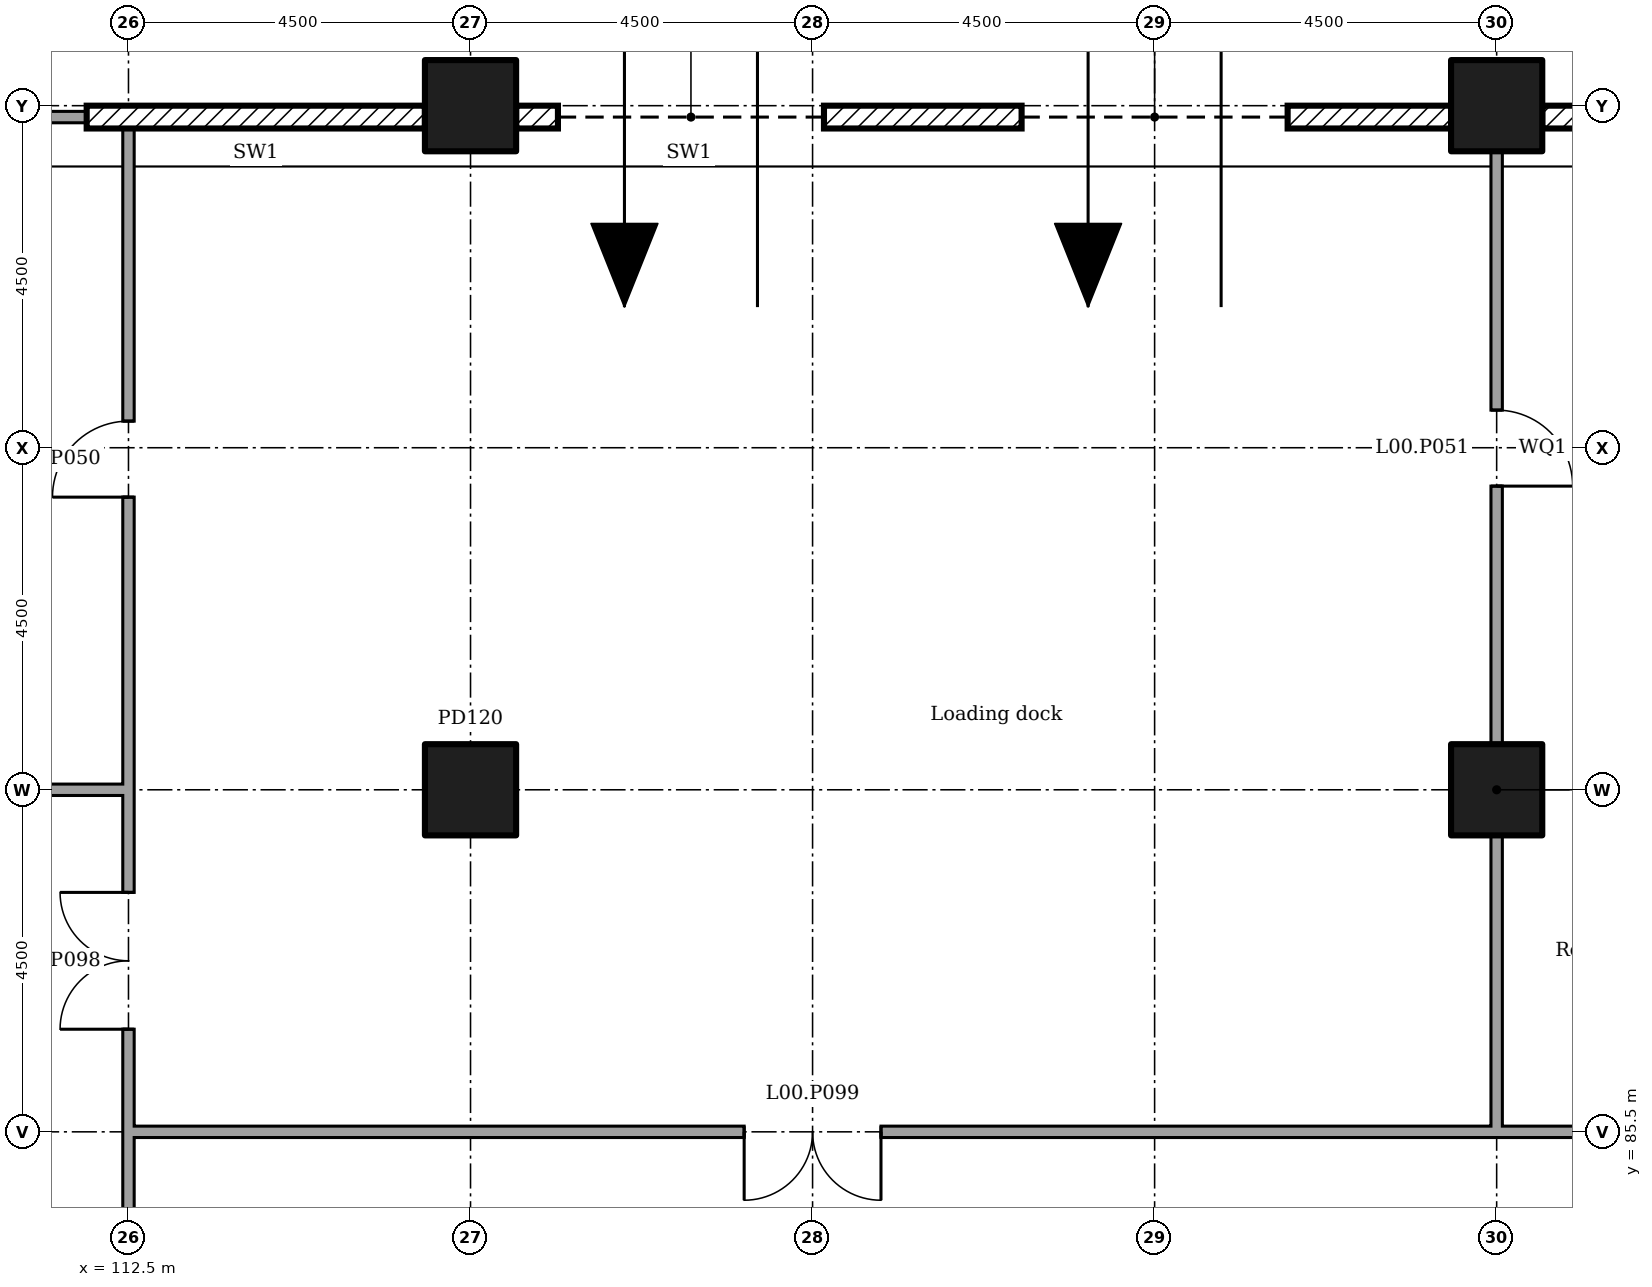
"""IFC4 building model, lengths in metres.
Left out: names, types, materials, properties, quantities, classifications, styles, units other than length and angle.
Written with IfcOpenShell. Run it as: python <this file> out.ifc"""

import sys

from ifc_helpers import new_model, si_unit, direction, frame, frame_2d, origin, origin_2d, place, context, subcontext, project, spatial, rectangle, extrude, element, fill, save


model = new_model("IFC4")
c1 = context("Model", 3, precision=1e-05, world=origin(), true_north=direction((0.0, 1.0)))
c2 = subcontext(c1, "Body", "Model", "MODEL_VIEW")
j1 = project(units=[si_unit("LENGTHUNIT", "METRE"), si_unit("PLANEANGLEUNIT", "RADIAN")], contexts=[c1])
p1 = place(None, origin())
s1 = spatial("IfcSite", under=j1, at=p1, CompositionType="ELEMENT")
p2 = place(p1, origin())
s2 = spatial("IfcBuilding", under=s1, at=p2, CompositionType="ELEMENT")
p3 = place(p2, origin())
s3 = spatial("IfcBuildingStorey", under=s2, at=p3, CompositionType="ELEMENT", Elevation=0.0)
for number, where in (
    (1, (117.0, 90.0, 0.0)),
    (2, (117.0, 99.0, 0.0)),
    (3, (130.5, 90.0, 0.0)),
    (4, (130.5, 99.0, 0.0)),
):
    element("IfcColumn", number, at=place(p3, frame(where)), inside=s3, PredefinedType="COLUMN", context=c2, shape_type="SweptSolid", body=[
        extrude(rectangle(XDim=1.2, YDim=1.2, at=origin_2d()), origin(), (0.0, 0.0, 1.0), 6.0),
    ])
p4 = place(p3, frame((135.217, 98.85, 0.0), z_axis=(0.0, 0.0, 1.0), x_axis=(-1.0, 0.0, 0.0)))
e5 = element("IfcWall", 5, at=p4, inside=s3, PredefinedType="ELEMENTEDWALL", context=c2, shape_type="SweptSolid", body=[
    extrude(rectangle(XDim=4.116, YDim=0.3, at=frame_2d((2.058, 0.0))), origin(), (0.0, 0.0, 1.0), 5.55),
])
p5 = place(p3, frame((129.9, 98.85, 0.0), z_axis=(0.0, 0.0, 1.0), x_axis=(-1.0, 0.0, 0.0)))
e6 = element("IfcWall", 6, at=p5, inside=s3, PredefinedType="ELEMENTEDWALL", context=c2, shape_type="SweptSolid", body=[
    extrude(rectangle(XDim=1.65, YDim=0.3, at=frame_2d((0.825, 0.0))), origin(), (0.0, 0.0, 1.0), 5.55),
])
p6 = place(p3, frame((128.25, 98.85, 0.0), z_axis=(0.0, 0.0, 1.0), x_axis=(-1.0, 0.0, 0.0)))
e7 = element("IfcWall", 7, at=p6, inside=s3, PredefinedType="ELEMENTEDWALL", context=c2, shape_type="SweptSolid", body=[
    extrude(rectangle(XDim=4.5, YDim=0.3, at=frame_2d((2.25, 0.0))), origin(), (0.0, 0.0, 1.0), 5.55),
])
p7 = place(p6, frame((0.5, 0.0, 0.0)))
e8 = element("IfcOpeningElement", 8, at=p7, cuts=e7, PredefinedType="OPENING", context=c2, shape_type="SweptSolid", body=[
    extrude(rectangle(XDim=3.5, YDim=4.5, at=frame_2d((1.75, 2.25))), frame((0.0, 0.16, 0.0), z_axis=(0.0, -1.0, 0.0), x_axis=(1.0, 0.0, 0.0)), (0.0, 0.0, 1.0), 0.32),
])
p8 = place(p3, frame((123.75, 98.85, 0.0), z_axis=(0.0, 0.0, 1.0), x_axis=(-1.0, 0.0, 0.0)))
e9 = element("IfcWall", 9, at=p8, inside=s3, PredefinedType="ELEMENTEDWALL", context=c2, shape_type="SweptSolid", body=[
    extrude(rectangle(XDim=1.6, YDim=0.3, at=frame_2d((0.8, 0.0))), origin(), (0.0, 0.0, 1.0), 5.55),
])
p9 = place(p3, frame((122.15, 98.85, 0.0), z_axis=(0.0, 0.0, 1.0), x_axis=(-1.0, 0.0, 0.0)))
e10 = element("IfcWall", 10, at=p9, inside=s3, PredefinedType="ELEMENTEDWALL", context=c2, shape_type="SweptSolid", body=[
    extrude(rectangle(XDim=4.55, YDim=0.3, at=frame_2d((2.275, 0.0))), origin(), (0.0, 0.0, 1.0), 5.55),
])
p10 = place(p9, frame((0.5, 0.0, 0.0)))
e11 = element("IfcOpeningElement", 11, at=p10, cuts=e10, PredefinedType="OPENING", context=c2, shape_type="SweptSolid", body=[
    extrude(rectangle(XDim=3.5, YDim=4.5, at=frame_2d((1.75, 2.25))), frame((0.0, 0.16, 0.0), z_axis=(0.0, -1.0, 0.0), x_axis=(1.0, 0.0, 0.0)), (0.0, 0.0, 1.0), 0.32),
])
p11 = place(p3, frame((116.4, 98.85, 0.0), z_axis=(0.0, 0.0, 1.0), x_axis=(-1.0, 0.0, 0.0)))
e12 = element("IfcWall", 12, at=p11, inside=s3, PredefinedType="ELEMENTEDWALL", context=c2, shape_type="SweptSolid", body=[
    extrude(rectangle(XDim=4.45, YDim=0.3, at=frame_2d((2.225, 0.0))), origin(), (0.0, 0.0, 1.0), 5.55),
])
p12 = place(p3, frame((111.95, 98.85, 0.0), z_axis=(0.0, 0.0, 1.0), x_axis=(-1.0, 0.0, 0.0)))
e13 = element("IfcWall", 13, at=p12, inside=s3, PredefinedType="SOLIDWALL", context=c2, shape_type="SweptSolid", body=[
    extrude(rectangle(XDim=3.4, YDim=0.15, at=frame_2d((1.7, 0.0))), origin(), (0.0, 0.0, 1.0), 5.55),
])
p13 = place(p12, frame((0.5, 0.0, 0.0)))
e14 = element("IfcOpeningElement", 14, at=p13, cuts=e13, PredefinedType="OPENING", context=c2, shape_type="SweptSolid", body=[
    extrude(rectangle(XDim=2.4, YDim=2.7, at=frame_2d((1.2, 1.35))), frame((0.0, 0.085, 0.0), z_axis=(0.0, -1.0, 0.0), x_axis=(1.0, 0.0, 0.0)), (0.0, 0.0, 1.0), 0.17),
])
p14 = place(p3, frame((112.5, 81.075, 0.0), z_axis=(0.0, 0.0, 1.0), x_axis=(0.0, 1.0, 0.0)))
e15 = element("IfcWall", 15, at=p14, inside=s3, PredefinedType="PARTITIONING", context=c2, shape_type="SweptSolid", body=[
    extrude(rectangle(XDim=4.5, YDim=0.15, at=frame_2d((2.25, 0.0))), origin(), (0.0, 0.0, 1.0), 5.55),
])
p15 = place(p14, frame((1.275, 0.0, 0.0)))
e16 = element("IfcOpeningElement", 16, at=p15, cuts=e15, PredefinedType="OPENING", context=c2, shape_type="SweptSolid", body=[
    extrude(rectangle(XDim=1.8, YDim=2.1, at=frame_2d((0.9, 1.05))), frame((0.0, 0.085, 0.0), z_axis=(0.0, -1.0, 0.0), x_axis=(1.0, 0.0, 0.0)), (0.0, 0.0, 1.0), 0.17),
])
p16 = place(p3, frame((104.095, 90.0, 0.0)))
e17 = element("IfcWall", 17, at=p16, inside=s3, PredefinedType="PARTITIONING", context=c2, shape_type="SweptSolid", body=[
    extrude(rectangle(XDim=8.48, YDim=0.15, at=frame_2d((4.24, 0.0))), origin(), (0.0, 0.0, 1.0), 5.55),
])
p17 = place(p3, frame((112.5, 85.5, 0.0), z_axis=(0.0, 0.0, 1.0), x_axis=(0.0, 1.0, 0.0)))
e18 = element("IfcWall", 18, at=p17, inside=s3, PredefinedType="PARTITIONING", context=c2, shape_type="SweptSolid", body=[
    extrude(rectangle(XDim=4.425, YDim=0.15, at=frame_2d((2.212, 0.0))), origin(), (0.0, 0.0, 1.0), 5.55),
])
p18 = place(p17, frame((1.35, 0.0, 0.0)))
e19 = element("IfcOpeningElement", 19, at=p18, cuts=e18, PredefinedType="OPENING", context=c2, shape_type="SweptSolid", body=[
    extrude(rectangle(XDim=1.8, YDim=2.1, at=frame_2d((0.9, 1.05))), frame((0.0, 0.085, 0.0), z_axis=(0.0, -1.0, 0.0), x_axis=(1.0, 0.0, 0.0)), (0.0, 0.0, 1.0), 0.17),
])
p19 = place(p3, frame((112.575, 85.5, 0.0)))
e20 = element("IfcWall", 20, at=p19, inside=s3, PredefinedType="PARTITIONING", context=c2, shape_type="SweptSolid", body=[
    extrude(rectangle(XDim=18.0, YDim=0.15, at=frame_2d((9.0, 0.0))), origin(), (0.0, 0.0, 1.0), 5.55),
])
p20 = place(p19, frame((8.025, 0.0, 0.0)))
e21 = element("IfcOpeningElement", 21, at=p20, cuts=e20, PredefinedType="OPENING", context=c2, shape_type="SweptSolid", body=[
    extrude(rectangle(XDim=1.8, YDim=2.1, at=frame_2d((0.9, 1.05))), frame((0.0, 0.085, 0.0), z_axis=(0.0, -1.0, 0.0), x_axis=(1.0, 0.0, 0.0)), (0.0, 0.0, 1.0), 0.17),
])
p21 = place(p3, frame((130.5, 85.5, 0.0)))
e22 = element("IfcWall", 22, at=p21, inside=s3, PredefinedType="PARTITIONING", context=c2, shape_type="SweptSolid", body=[
    extrude(rectangle(XDim=4.425, YDim=0.15, at=frame_2d((2.212, 0.0))), origin(), (0.0, 0.0, 1.0), 5.55),
])
p22 = place(p3, frame((112.5, 90.0, 0.0), z_axis=(0.0, 0.0, 1.0), x_axis=(0.0, 1.0, 0.0)))
e23 = element("IfcWall", 23, at=p22, inside=s3, PredefinedType="PARTITIONING", context=c2, shape_type="SweptSolid", body=[
    extrude(rectangle(XDim=8.7, YDim=0.15, at=frame_2d((4.35, 0.0))), origin(), (0.0, 0.0, 1.0), 5.55),
])
p23 = place(p22, frame((3.85, 0.0, 0.0)))
e24 = element("IfcOpeningElement", 24, at=p23, cuts=e23, PredefinedType="OPENING", context=c2, shape_type="SweptSolid", body=[
    extrude(rectangle(XDim=1.0, YDim=2.1, at=frame_2d((0.5, 1.05))), frame((0.0, 0.085, 0.0), z_axis=(0.0, -1.0, 0.0), x_axis=(1.0, 0.0, 0.0)), (0.0, 0.0, 1.0), 0.17),
])
p24 = place(p3, frame((130.5, 85.575, 0.0), z_axis=(0.0, 0.0, 1.0), x_axis=(0.0, 1.0, 0.0)))
e25 = element("IfcWall", 25, at=p24, inside=s3, PredefinedType="PARTITIONING", context=c2, shape_type="SweptSolid", body=[
    extrude(rectangle(XDim=3.83, YDim=0.15, at=frame_2d((1.915, 0.0))), origin(), (0.0, 0.0, 1.0), 5.55),
])
p25 = place(p3, frame((130.5, 90.595, 0.0), z_axis=(0.0, 0.0, 1.0), x_axis=(0.0, 1.0, 0.0)))
e26 = element("IfcWall", 26, at=p25, inside=s3, PredefinedType="PARTITIONING", context=c2, shape_type="SweptSolid", body=[
    extrude(rectangle(XDim=7.81, YDim=0.15, at=frame_2d((3.905, 0.0))), origin(), (0.0, 0.0, 1.0), 5.55),
])
p26 = place(p25, frame((3.4, 0.0, 0.0)))
e27 = element("IfcOpeningElement", 27, at=p26, cuts=e26, PredefinedType="OPENING", context=c2, shape_type="SweptSolid", body=[
    extrude(rectangle(XDim=1.0, YDim=2.1, at=frame_2d((0.5, 1.05))), frame((0.0, 0.085, 0.0), z_axis=(0.0, -1.0, 0.0), x_axis=(1.0, 0.0, 0.0)), (0.0, 0.0, 1.0), 0.17),
])
p27 = place(p7, origin())
e28 = element("IfcDoor", 28, at=p27, inside=s3, OperationType="ROLLINGUP", PredefinedType="NOTDEFINED", context=c2, shape_type="SweptSolid", body=[
    extrude(rectangle(XDim=3.5, YDim=4.5, at=frame_2d((1.75, 2.25))), frame((0.0, 0.025, 0.0), z_axis=(0.0, -1.0, 0.0), x_axis=(1.0, 0.0, 0.0)), (0.0, 0.0, 1.0), 0.05),
])
fill(e8, e28)
p28 = place(p10, origin())
e29 = element("IfcDoor", 29, at=p28, inside=s3, OperationType="ROLLINGUP", PredefinedType="NOTDEFINED", context=c2, shape_type="SweptSolid", body=[
    extrude(rectangle(XDim=3.5, YDim=4.5, at=frame_2d((1.75, 2.25))), frame((0.0, 0.025, 0.0), z_axis=(0.0, -1.0, 0.0), x_axis=(1.0, 0.0, 0.0)), (0.0, 0.0, 1.0), 0.05),
])
fill(e11, e29)
p29 = place(p23, origin())
e30 = element("IfcDoor", 30, at=p29, inside=s3, OperationType="SINGLE_SWING_RIGHT", PredefinedType="DOOR", context=c2, shape_type="SweptSolid", body=[
    extrude(rectangle(XDim=1.0, YDim=2.1, at=frame_2d((0.5, 1.05))), frame((0.0, 0.025, 0.0), z_axis=(0.0, -1.0, 0.0), x_axis=(1.0, 0.0, 0.0)), (0.0, 0.0, 1.0), 0.05),
])
fill(e24, e30)
p30 = place(p26, frame((1.0, 0.0, 0.0), x_axis=(-1.0, 0.0, 0.0)))
e31 = element("IfcDoor", 31, at=p30, inside=s3, OperationType="SINGLE_SWING_LEFT", PredefinedType="DOOR", context=c2, shape_type="SweptSolid", body=[
    extrude(rectangle(XDim=1.0, YDim=2.1, at=frame_2d((0.5, 1.05))), frame((0.0, 0.025, 0.0), z_axis=(0.0, -1.0, 0.0), x_axis=(1.0, 0.0, 0.0)), (0.0, 0.0, 1.0), 0.05),
])
fill(e27, e31)
p31 = place(p18, origin())
e32 = element("IfcDoor", 32, at=p31, inside=s3, OperationType="DOUBLE_DOOR_SINGLE_SWING", PredefinedType="DOOR", context=c2, shape_type="SweptSolid", body=[
    extrude(rectangle(XDim=1.8, YDim=2.1, at=frame_2d((0.9, 1.05))), frame((0.0, 0.025, 0.0), z_axis=(0.0, -1.0, 0.0), x_axis=(1.0, 0.0, 0.0)), (0.0, 0.0, 1.0), 0.05),
])
fill(e19, e32)
p32 = place(p20, frame((1.8, 0.0, 0.0), x_axis=(-1.0, 0.0, 0.0)))
e33 = element("IfcDoor", 33, at=p32, inside=s3, OperationType="DOUBLE_DOOR_SINGLE_SWING", PredefinedType="DOOR", context=c2, shape_type="SweptSolid", body=[
    extrude(rectangle(XDim=1.8, YDim=2.1, at=frame_2d((0.9, 1.05))), frame((0.0, 0.025, 0.0), z_axis=(0.0, -1.0, 0.0), x_axis=(1.0, 0.0, 0.0)), (0.0, 0.0, 1.0), 0.05),
])
fill(e21, e33)
save(model, sys.argv[1])
